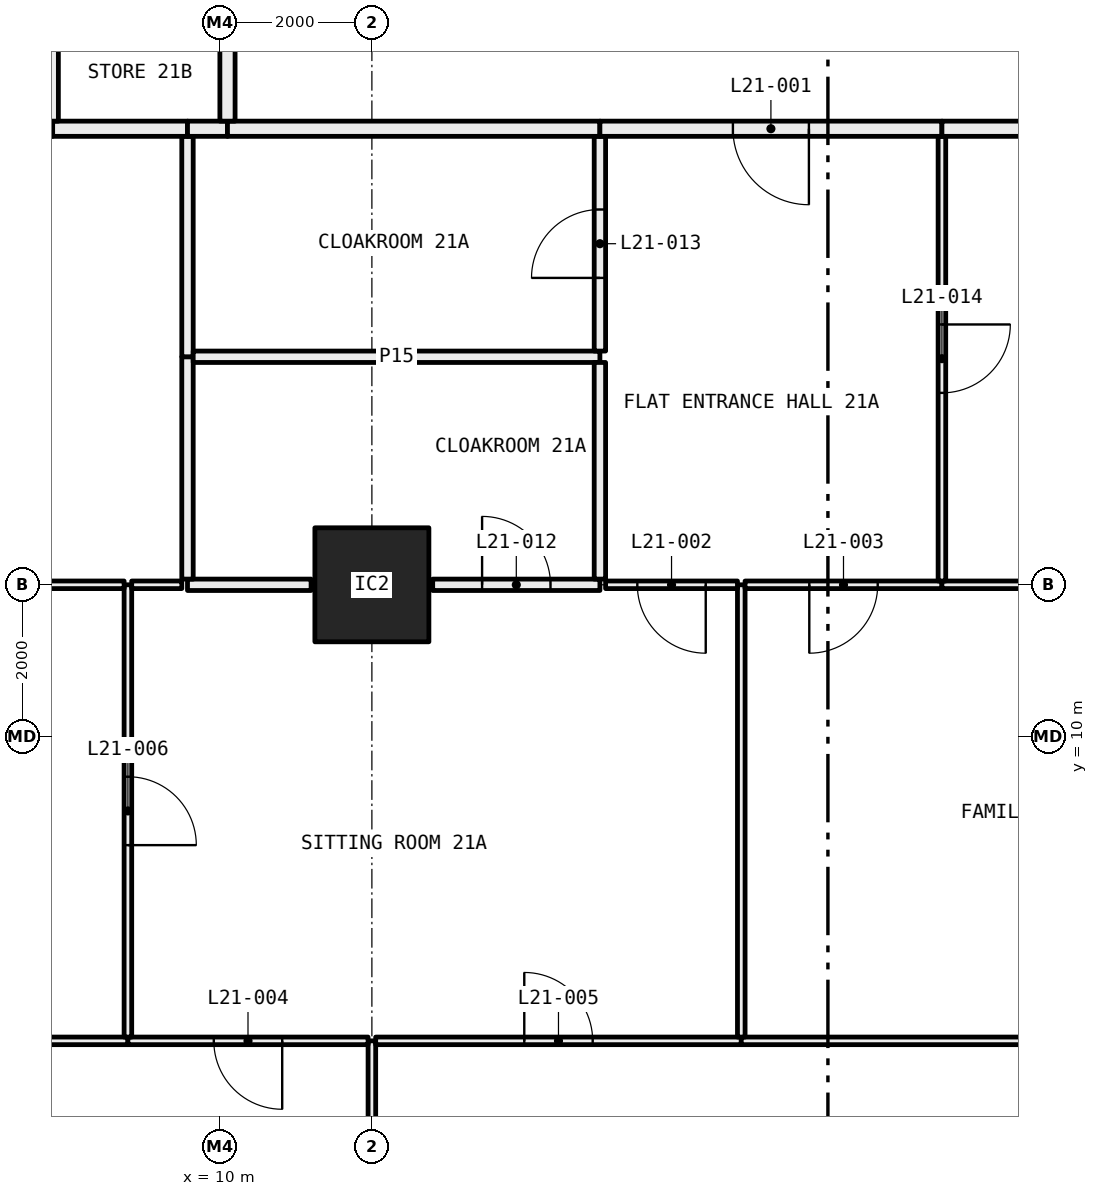
"""IFC4 building model, lengths in metres.
Left out: names, types, materials, properties, quantities, classifications, styles, units other than length and angle.
Written with IfcOpenShell. Run it as: python <this file> out.ifc"""

import sys

from ifc_helpers import new_model, si_unit, direction, frame, frame_2d, origin, origin_2d, place, context, subcontext, project, spatial, rectangle, hollow_rectangle, extrude, element, fill, save


model = new_model("IFC4")
c1 = context("Model", 3, precision=1e-05, world=origin(), true_north=direction((0.0, 1.0)))
c2 = subcontext(c1, "Body", "Model", "MODEL_VIEW")
j1 = project(units=[si_unit("LENGTHUNIT", "METRE"), si_unit("PLANEANGLEUNIT", "RADIAN")], contexts=[c1])
p1 = place(None, origin())
s1 = spatial("IfcSite", under=j1, at=p1, CompositionType="ELEMENT")
p2 = place(p1, origin())
s2 = spatial("IfcBuilding", under=s1, at=p2, CompositionType="ELEMENT")
p3 = place(p2, frame((0.0, 0.0, 85.2)))
s3 = spatial("IfcBuildingStorey", under=s2, at=p3, CompositionType="ELEMENT", Elevation=85.2)
p4 = place(p3, frame((12.0, 12.0, 0.0), z_axis=(0.0, 0.0, 1.0), x_axis=(1.0, 0.0, 0.0)))
e1 = element("IfcColumn", 1, at=p4, inside=s3, PredefinedType="COLUMN", context=c2, shape_type="SweptSolid", body=[
    extrude(hollow_rectangle(XDim=1.5, YDim=1.5, WallThickness=0.065, at=origin_2d()), origin(), (0.0, 0.0, 1.0), 3.05),
])
p5 = place(p3, frame((12.0, 0.72, 0.0), z_axis=(0.0, 0.0, 1.0), x_axis=(0.0, 1.0, 0.0)))
e2 = element("IfcWall", 2, at=p5, inside=s3, PredefinedType="PARTITIONING", context=c2, shape_type="SweptSolid", body=[
    extrude(rectangle(XDim=5.28, YDim=0.1, at=frame_2d((2.64, 0.0))), origin(), (0.0, 0.0, 1.0), 2.45),
])
p6 = place(p3, frame((8.79, 6.0, 0.0), z_axis=(0.0, 0.0, 1.0), x_axis=(-1.0, 0.0, 0.0)))
e3 = element("IfcWall", 3, at=p6, inside=s3, PredefinedType="PARTITIONING", context=c2, shape_type="SweptSolid", body=[
    extrude(rectangle(XDim=2.07, YDim=0.1, at=frame_2d((1.035, 0.0))), origin(), (0.0, 0.0, 1.0), 3.05),
])
p7 = place(p3, frame((11.95, 6.0, 0.0), z_axis=(0.0, 0.0, 1.0), x_axis=(-1.0, 0.0, 0.0)))
e4 = element("IfcWall", 4, at=p7, inside=s3, PredefinedType="PARTITIONING", context=c2, shape_type="SweptSolid", body=[
    extrude(rectangle(XDim=3.16, YDim=0.1, at=frame_2d((1.58, 0.0))), origin(), (0.0, 0.0, 1.0), 2.45),
])
p8 = place(p7, frame((1.13, 0.0, 0.0)))
e5 = element("IfcOpeningElement", 5, at=p8, cuts=e4, PredefinedType="OPENING", context=c2, shape_type="SweptSolid", body=[
    extrude(rectangle(XDim=0.9, YDim=2.1, at=frame_2d((0.45, 1.05))), frame((0.0, 0.06, 0.0), z_axis=(0.0, -1.0, 0.0), x_axis=(1.0, 0.0, 0.0)), (0.0, 0.0, 1.0), 0.12),
])
p9 = place(p3, frame((16.86, 6.0, 0.0), z_axis=(0.0, 0.0, 1.0), x_axis=(-1.0, 0.0, 0.0)))
e6 = element("IfcWall", 6, at=p9, inside=s3, PredefinedType="PARTITIONING", context=c2, shape_type="SweptSolid", body=[
    extrude(rectangle(XDim=4.81, YDim=0.1, at=frame_2d((2.405, 0.0))), origin(), (0.0, 0.0, 1.0), 2.45),
])
p10 = place(p9, frame((1.955, 0.0, 0.0)))
e7 = element("IfcOpeningElement", 7, at=p10, cuts=e6, PredefinedType="OPENING", context=c2, shape_type="SweptSolid", body=[
    extrude(rectangle(XDim=0.9, YDim=2.1, at=frame_2d((0.45, 1.05))), frame((0.0, 0.06, 0.0), z_axis=(0.0, -1.0, 0.0), x_axis=(1.0, 0.0, 0.0)), (0.0, 0.0, 1.0), 0.12),
])
p11 = place(p3, frame((23.95, 6.0, 0.0), z_axis=(0.0, 0.0, 1.0), x_axis=(-1.0, 0.0, 0.0)))
e8 = element("IfcWall", 8, at=p11, inside=s3, PredefinedType="PARTITIONING", context=c2, shape_type="SweptSolid", body=[
    extrude(rectangle(XDim=7.09, YDim=0.1, at=frame_2d((3.545, 0.0))), origin(), (0.0, 0.0, 1.0), 2.45),
])
p12 = place(p3, frame((8.79, 6.05, 0.0), z_axis=(0.0, 0.0, 1.0), x_axis=(0.0, 1.0, 0.0)))
e9 = element("IfcWall", 9, at=p12, inside=s3, PredefinedType="PARTITIONING", context=c2, shape_type="SweptSolid", body=[
    extrude(rectangle(XDim=5.95, YDim=0.1, at=frame_2d((2.975, 0.0))), origin(), (0.0, 0.0, 1.0), 2.45),
])
p13 = place(p12, frame((2.525, 0.0, 0.0)))
e10 = element("IfcOpeningElement", 10, at=p13, cuts=e9, PredefinedType="OPENING", context=c2, shape_type="SweptSolid", body=[
    extrude(rectangle(XDim=0.9, YDim=2.1, at=frame_2d((0.45, 1.05))), frame((0.0, 0.06, 0.0), z_axis=(0.0, -1.0, 0.0), x_axis=(1.0, 0.0, 0.0)), (0.0, 0.0, 1.0), 0.12),
])
p14 = place(p3, frame((8.74, 12.0, 0.0), z_axis=(0.0, 0.0, 1.0), x_axis=(-1.0, 0.0, 0.0)))
e11 = element("IfcWall", 11, at=p14, inside=s3, PredefinedType="PARTITIONING", context=c2, shape_type="SweptSolid", body=[
    extrude(rectangle(XDim=8.02, YDim=0.1, at=frame_2d((4.01, 0.0))), origin(), (0.0, 0.0, 1.0), 2.45),
])
p15 = place(p14, frame((3.56, 0.0, 0.0)))
e12 = element("IfcOpeningElement", 12, at=p15, cuts=e11, PredefinedType="OPENING", context=c2, shape_type="SweptSolid", body=[
    extrude(rectangle(XDim=0.9, YDim=2.1, at=frame_2d((0.45, 1.05))), frame((0.0, 0.06, 0.0), z_axis=(0.0, -1.0, 0.0), x_axis=(1.0, 0.0, 0.0)), (0.0, 0.0, 1.0), 0.12),
])
p16 = place(p3, frame((16.86, 6.05, 0.0), z_axis=(0.0, 0.0, 1.0), x_axis=(0.0, 1.0, 0.0)))
e13 = element("IfcWall", 13, at=p16, inside=s3, PredefinedType="PARTITIONING", context=c2, shape_type="SweptSolid", body=[
    extrude(rectangle(XDim=5.95, YDim=0.1, at=frame_2d((2.975, 0.0))), origin(), (0.0, 0.0, 1.0), 2.45),
])
p17 = place(p3, frame((9.499, 12.0, 0.0), z_axis=(0.0, 0.0, 1.0), x_axis=(-1.0, 0.0, 0.0)))
e14 = element("IfcWall", 14, at=p17, inside=s3, PredefinedType="PARTITIONING", context=c2, shape_type="SweptSolid", body=[
    extrude(rectangle(XDim=0.659, YDim=0.1, at=frame_2d((0.33, 0.0))), origin(), (0.0, 0.0, 1.0), 2.45),
])
p18 = place(p3, frame((11.2, 12.0, 0.0), z_axis=(0.0, 0.0, 1.0), x_axis=(-1.0, 0.0, 0.0)))
e15 = element("IfcWall", 15, at=p18, inside=s3, PredefinedType="PARTITIONING", context=c2, shape_type="SweptSolid", body=[
    extrude(rectangle(XDim=1.626, YDim=0.15, at=frame_2d((0.813, 0.0))), origin(), (0.0, 0.0, 1.0), 2.45),
])
p19 = place(p3, frame((15.0, 12.0, 0.0), z_axis=(0.0, 0.0, 1.0), x_axis=(-1.0, 0.0, 0.0)))
e16 = element("IfcWall", 16, at=p19, inside=s3, PredefinedType="PARTITIONING", context=c2, shape_type="SweptSolid", body=[
    extrude(rectangle(XDim=2.2, YDim=0.15, at=frame_2d((1.1, 0.0))), origin(), (0.0, 0.0, 1.0), 2.45),
])
p20 = place(p19, frame((0.65, 0.0, 0.0)))
e17 = element("IfcOpeningElement", 17, at=p20, cuts=e16, PredefinedType="OPENING", context=c2, shape_type="SweptSolid", body=[
    extrude(rectangle(XDim=0.9, YDim=2.1, at=frame_2d((0.45, 1.05))), frame((0.0, 0.085, 0.0), z_axis=(0.0, -1.0, 0.0), x_axis=(1.0, 0.0, 0.0)), (0.0, 0.0, 1.0), 0.17),
])
p21 = place(p3, frame((16.81, 12.0, 0.0), z_axis=(0.0, 0.0, 1.0), x_axis=(-1.0, 0.0, 0.0)))
e18 = element("IfcWall", 18, at=p21, inside=s3, PredefinedType="PARTITIONING", context=c2, shape_type="SweptSolid", body=[
    extrude(rectangle(XDim=1.735, YDim=0.1, at=frame_2d((0.868, 0.0))), origin(), (0.0, 0.0, 1.0), 2.45),
])
p22 = place(p21, frame((0.417, 0.0, 0.0)))
e19 = element("IfcOpeningElement", 19, at=p22, cuts=e18, PredefinedType="OPENING", context=c2, shape_type="SweptSolid", body=[
    extrude(rectangle(XDim=0.9, YDim=2.1, at=frame_2d((0.45, 1.05))), frame((0.0, 0.06, 0.0), z_axis=(0.0, -1.0, 0.0), x_axis=(1.0, 0.0, 0.0)), (0.0, 0.0, 1.0), 0.12),
])
p23 = place(p3, frame((19.5, 12.0, 0.0), z_axis=(0.0, 0.0, 1.0), x_axis=(-1.0, 0.0, 0.0)))
e20 = element("IfcWall", 20, at=p23, inside=s3, PredefinedType="PARTITIONING", context=c2, shape_type="SweptSolid", body=[
    extrude(rectangle(XDim=2.59, YDim=0.1, at=frame_2d((1.295, 0.0))), origin(), (0.0, 0.0, 1.0), 2.45),
])
p24 = place(p23, frame((0.845, 0.0, 0.0)))
e21 = element("IfcOpeningElement", 21, at=p24, cuts=e20, PredefinedType="OPENING", context=c2, shape_type="SweptSolid", body=[
    extrude(rectangle(XDim=0.9, YDim=2.1, at=frame_2d((0.45, 1.05))), frame((0.0, 0.06, 0.0), z_axis=(0.0, -1.0, 0.0), x_axis=(1.0, 0.0, 0.0)), (0.0, 0.0, 1.0), 0.12),
])
p25 = place(p3, frame((23.2, 12.0, 0.0), z_axis=(0.0, 0.0, 1.0), x_axis=(-1.0, 0.0, 0.0)))
e22 = element("IfcWall", 22, at=p25, inside=s3, PredefinedType="PARTITIONING", context=c2, shape_type="SweptSolid", body=[
    extrude(rectangle(XDim=3.7, YDim=0.1, at=frame_2d((1.85, 0.0))), origin(), (0.0, 0.0, 1.0), 2.45),
])
p26 = place(p3, frame((9.574, 12.075, 0.0), z_axis=(0.0, 0.0, 1.0), x_axis=(0.0, 1.0, 0.0)))
e23 = element("IfcWall", 23, at=p26, inside=s3, PredefinedType="PARTITIONING", context=c2, shape_type="SweptSolid", body=[
    extrude(rectangle(XDim=2.925, YDim=0.15, at=frame_2d((1.462, 0.0))), origin(), (0.0, 0.0, 1.0), 2.45),
])
p27 = place(p3, frame((9.574, 15.0, 0.0), z_axis=(0.0, 0.0, 1.0), x_axis=(0.0, 1.0, 0.0)))
e24 = element("IfcWall", 24, at=p27, inside=s3, PredefinedType="PARTITIONING", context=c2, shape_type="SweptSolid", body=[
    extrude(rectangle(XDim=2.9, YDim=0.15, at=frame_2d((1.45, 0.0))), origin(), (0.0, 0.0, 1.0), 3.05),
])
p28 = place(p3, frame((7.8, 18.0, 0.0), z_axis=(0.0, 0.0, 1.0), x_axis=(-1.0, 0.0, 0.0)))
e25 = element("IfcWall", 25, at=p28, inside=s3, PredefinedType="PARTITIONING", context=c2, shape_type="SweptSolid", body=[
    extrude(rectangle(XDim=1.8, YDim=0.2, at=frame_2d((0.9, 0.0))), origin(), (0.0, 0.0, 1.0), 3.05),
])
p29 = place(p3, frame((9.574, 18.0, 0.0), z_axis=(0.0, 0.0, 1.0), x_axis=(-1.0, 0.0, 0.0)))
e26 = element("IfcWall", 26, at=p29, inside=s3, PredefinedType="PARTITIONING", context=c2, shape_type="SweptSolid", body=[
    extrude(rectangle(XDim=1.774, YDim=0.2, at=frame_2d((0.887, 0.0))), origin(), (0.0, 0.0, 1.0), 3.05),
])
p30 = place(p3, frame((15.0, 15.0, 0.0), z_axis=(0.0, 0.0, 1.0), x_axis=(-1.0, 0.0, 0.0)))
e27 = element("IfcWall", 27, at=p30, inside=s3, PredefinedType="PARTITIONING", context=c2, shape_type="SweptSolid", body=[
    extrude(rectangle(XDim=5.351, YDim=0.15, at=frame_2d((2.676, 0.0))), origin(), (0.0, 0.0, 1.0), 3.05),
])
p31 = place(p3, frame((15.0, 12.075, 0.0), z_axis=(0.0, 0.0, 1.0), x_axis=(0.0, 1.0, 0.0)))
e28 = element("IfcWall", 28, at=p31, inside=s3, PredefinedType="PARTITIONING", context=c2, shape_type="SweptSolid", body=[
    extrude(rectangle(XDim=2.85, YDim=0.15, at=frame_2d((1.425, 0.0))), origin(), (0.0, 0.0, 1.0), 2.45),
])
p32 = place(p3, frame((15.0, 15.075, 0.0), z_axis=(0.0, 0.0, 1.0), x_axis=(0.0, 1.0, 0.0)))
e29 = element("IfcWall", 29, at=p32, inside=s3, PredefinedType="PARTITIONING", context=c2, shape_type="SweptSolid", body=[
    extrude(rectangle(XDim=2.825, YDim=0.15, at=frame_2d((1.413, 0.0))), origin(), (0.0, 0.0, 1.0), 3.05),
])
p33 = place(p32, frame((0.962, 0.0, 0.0)))
e30 = element("IfcOpeningElement", 30, at=p33, cuts=e29, PredefinedType="OPENING", context=c2, shape_type="SweptSolid", body=[
    extrude(rectangle(XDim=0.9, YDim=2.1, at=frame_2d((0.45, 1.05))), frame((0.0, 0.085, 0.0), z_axis=(0.0, -1.0, 0.0), x_axis=(1.0, 0.0, 0.0)), (0.0, 0.0, 1.0), 0.17),
])
p34 = place(p3, frame((10.1, 18.0, 0.0), z_axis=(0.0, 0.0, 1.0), x_axis=(-1.0, 0.0, 0.0)))
e31 = element("IfcWall", 31, at=p34, inside=s3, PredefinedType="PARTITIONING", context=c2, shape_type="SweptSolid", body=[
    extrude(rectangle(XDim=0.526, YDim=0.2, at=frame_2d((0.263, 0.0))), origin(), (0.0, 0.0, 1.0), 3.05),
])
p35 = place(p3, frame((15.0, 18.0, 0.0), z_axis=(0.0, 0.0, 1.0), x_axis=(-1.0, 0.0, 0.0)))
e32 = element("IfcWall", 32, at=p35, inside=s3, PredefinedType="PARTITIONING", context=c2, shape_type="SweptSolid", body=[
    extrude(rectangle(XDim=4.9, YDim=0.2, at=frame_2d((2.45, 0.0))), origin(), (0.0, 0.0, 1.0), 3.05),
])
p36 = place(p3, frame((19.5, 12.05, 0.0), z_axis=(0.0, 0.0, 1.0), x_axis=(0.0, 1.0, 0.0)))
e33 = element("IfcWall", 33, at=p36, inside=s3, PredefinedType="PARTITIONING", context=c2, shape_type="SweptSolid", body=[
    extrude(rectangle(XDim=5.85, YDim=0.1, at=frame_2d((2.925, 0.0))), origin(), (0.0, 0.0, 1.0), 2.45),
])
p37 = place(p36, frame((2.475, 0.0, 0.0)))
e34 = element("IfcOpeningElement", 34, at=p37, cuts=e33, PredefinedType="OPENING", context=c2, shape_type="SweptSolid", body=[
    extrude(rectangle(XDim=0.9, YDim=2.1, at=frame_2d((0.45, 1.05))), frame((0.0, 0.06, 0.0), z_axis=(0.0, -1.0, 0.0), x_axis=(1.0, 0.0, 0.0)), (0.0, 0.0, 1.0), 0.12),
])
p38 = place(p3, frame((19.5, 18.0, 0.0), z_axis=(0.0, 0.0, 1.0), x_axis=(-1.0, 0.0, 0.0)))
e35 = element("IfcWall", 35, at=p38, inside=s3, PredefinedType="PARTITIONING", context=c2, shape_type="SweptSolid", body=[
    extrude(rectangle(XDim=4.5, YDim=0.2, at=frame_2d((2.25, 0.0))), origin(), (0.0, 0.0, 1.0), 3.05),
])
p39 = place(p38, frame((1.75, 0.0, 0.0)))
e36 = element("IfcOpeningElement", 36, at=p39, cuts=e35, PredefinedType="OPENING", context=c2, shape_type="SweptSolid", body=[
    extrude(rectangle(XDim=1.0, YDim=2.1, at=frame_2d((0.5, 1.05))), frame((0.0, 0.11, 0.0), z_axis=(0.0, -1.0, 0.0), x_axis=(1.0, 0.0, 0.0)), (0.0, 0.0, 1.0), 0.22),
])
p40 = place(p3, frame((25.9, 18.0, 0.0), z_axis=(0.0, 0.0, 1.0), x_axis=(-1.0, 0.0, 0.0)))
e37 = element("IfcWall", 37, at=p40, inside=s3, PredefinedType="PARTITIONING", context=c2, shape_type="SweptSolid", body=[
    extrude(rectangle(XDim=6.4, YDim=0.2, at=frame_2d((3.2, 0.0))), origin(), (0.0, 0.0, 1.0), 3.05),
])
p41 = place(p3, frame((7.8, 18.1, 0.0), z_axis=(0.0, 0.0, 1.0), x_axis=(0.0, 1.0, 0.0)))
e38 = element("IfcWall", 38, at=p41, inside=s3, PredefinedType="PARTITIONING", context=c2, shape_type="SweptSolid", body=[
    extrude(rectangle(XDim=2.9, YDim=0.15, at=frame_2d((1.45, 0.0))), origin(), (0.0, 0.0, 1.0), 3.05),
])
p42 = place(p3, frame((10.1, 18.1, 0.0), z_axis=(0.0, 0.0, 1.0), x_axis=(0.0, 1.0, 0.0)))
e39 = element("IfcWall", 39, at=p42, inside=s3, PredefinedType="PARTITIONING", context=c2, shape_type="SweptSolid", body=[
    extrude(rectangle(XDim=2.9, YDim=0.2, at=frame_2d((1.45, 0.0))), origin(), (0.0, 0.0, 1.0), 3.05),
])
p43 = place(p39, origin())
e40 = element("IfcDoor", 40, at=p43, inside=s3, OperationType="SINGLE_SWING_RIGHT", PredefinedType="DOOR", context=c2, shape_type="SweptSolid", body=[
    extrude(rectangle(XDim=1.0, YDim=2.1, at=frame_2d((0.5, 1.05))), frame((0.0, 0.025, 0.0), z_axis=(0.0, -1.0, 0.0), x_axis=(1.0, 0.0, 0.0)), (0.0, 0.0, 1.0), 0.05),
])
fill(e36, e40)
p44 = place(p22, origin())
e41 = element("IfcDoor", 41, at=p44, inside=s3, OperationType="SINGLE_SWING_RIGHT", PredefinedType="DOOR", context=c2, shape_type="SweptSolid", body=[
    extrude(rectangle(XDim=0.9, YDim=2.1, at=frame_2d((0.45, 1.05))), frame((0.0, 0.025, 0.0), z_axis=(0.0, -1.0, 0.0), x_axis=(1.0, 0.0, 0.0)), (0.0, 0.0, 1.0), 0.05),
])
fill(e19, e41)
p45 = place(p24, origin())
e42 = element("IfcDoor", 42, at=p45, inside=s3, OperationType="SINGLE_SWING_LEFT", PredefinedType="DOOR", context=c2, shape_type="SweptSolid", body=[
    extrude(rectangle(XDim=0.9, YDim=2.1, at=frame_2d((0.45, 1.05))), frame((0.0, 0.025, 0.0), z_axis=(0.0, -1.0, 0.0), x_axis=(1.0, 0.0, 0.0)), (0.0, 0.0, 1.0), 0.05),
])
fill(e21, e42)
p46 = place(p8, origin())
e43 = element("IfcDoor", 43, at=p46, inside=s3, OperationType="SINGLE_SWING_RIGHT", PredefinedType="DOOR", context=c2, shape_type="SweptSolid", body=[
    extrude(rectangle(XDim=0.9, YDim=2.1, at=frame_2d((0.45, 1.05))), frame((0.0, 0.025, 0.0), z_axis=(0.0, -1.0, 0.0), x_axis=(1.0, 0.0, 0.0)), (0.0, 0.0, 1.0), 0.05),
])
fill(e5, e43)
p47 = place(p10, frame((0.9, 0.0, 0.0), x_axis=(-1.0, 0.0, 0.0)))
e44 = element("IfcDoor", 44, at=p47, inside=s3, OperationType="SINGLE_SWING_RIGHT", PredefinedType="DOOR", context=c2, shape_type="SweptSolid", body=[
    extrude(rectangle(XDim=0.9, YDim=2.1, at=frame_2d((0.45, 1.05))), frame((0.0, 0.025, 0.0), z_axis=(0.0, -1.0, 0.0), x_axis=(1.0, 0.0, 0.0)), (0.0, 0.0, 1.0), 0.05),
])
fill(e7, e44)
p48 = place(p13, frame((0.9, 0.0, 0.0), x_axis=(-1.0, 0.0, 0.0)))
e45 = element("IfcDoor", 45, at=p48, inside=s3, OperationType="SINGLE_SWING_LEFT", PredefinedType="DOOR", context=c2, shape_type="SweptSolid", body=[
    extrude(rectangle(XDim=0.9, YDim=2.1, at=frame_2d((0.45, 1.05))), frame((0.0, 0.025, 0.0), z_axis=(0.0, -1.0, 0.0), x_axis=(1.0, 0.0, 0.0)), (0.0, 0.0, 1.0), 0.05),
])
fill(e10, e45)
p49 = place(p20, frame((0.9, 0.0, 0.0), x_axis=(-1.0, 0.0, 0.0)))
e46 = element("IfcDoor", 46, at=p49, inside=s3, OperationType="SINGLE_SWING_RIGHT", PredefinedType="DOOR", context=c2, shape_type="SweptSolid", body=[
    extrude(rectangle(XDim=0.9, YDim=2.1, at=frame_2d((0.45, 1.05))), frame((0.0, 0.025, 0.0), z_axis=(0.0, -1.0, 0.0), x_axis=(1.0, 0.0, 0.0)), (0.0, 0.0, 1.0), 0.05),
])
fill(e17, e46)
p50 = place(p33, origin())
e47 = element("IfcDoor", 47, at=p50, inside=s3, OperationType="SINGLE_SWING_RIGHT", PredefinedType="DOOR", context=c2, shape_type="SweptSolid", body=[
    extrude(rectangle(XDim=0.9, YDim=2.1, at=frame_2d((0.45, 1.05))), frame((0.0, 0.025, 0.0), z_axis=(0.0, -1.0, 0.0), x_axis=(1.0, 0.0, 0.0)), (0.0, 0.0, 1.0), 0.05),
])
fill(e30, e47)
p51 = place(p37, frame((0.9, 0.0, 0.0), x_axis=(-1.0, 0.0, 0.0)))
e48 = element("IfcDoor", 48, at=p51, inside=s3, OperationType="SINGLE_SWING_RIGHT", PredefinedType="DOOR", context=c2, shape_type="SweptSolid", body=[
    extrude(rectangle(XDim=0.9, YDim=2.1, at=frame_2d((0.45, 1.05))), frame((0.0, 0.025, 0.0), z_axis=(0.0, -1.0, 0.0), x_axis=(1.0, 0.0, 0.0)), (0.0, 0.0, 1.0), 0.05),
])
fill(e34, e48)
save(model, sys.argv[1])
